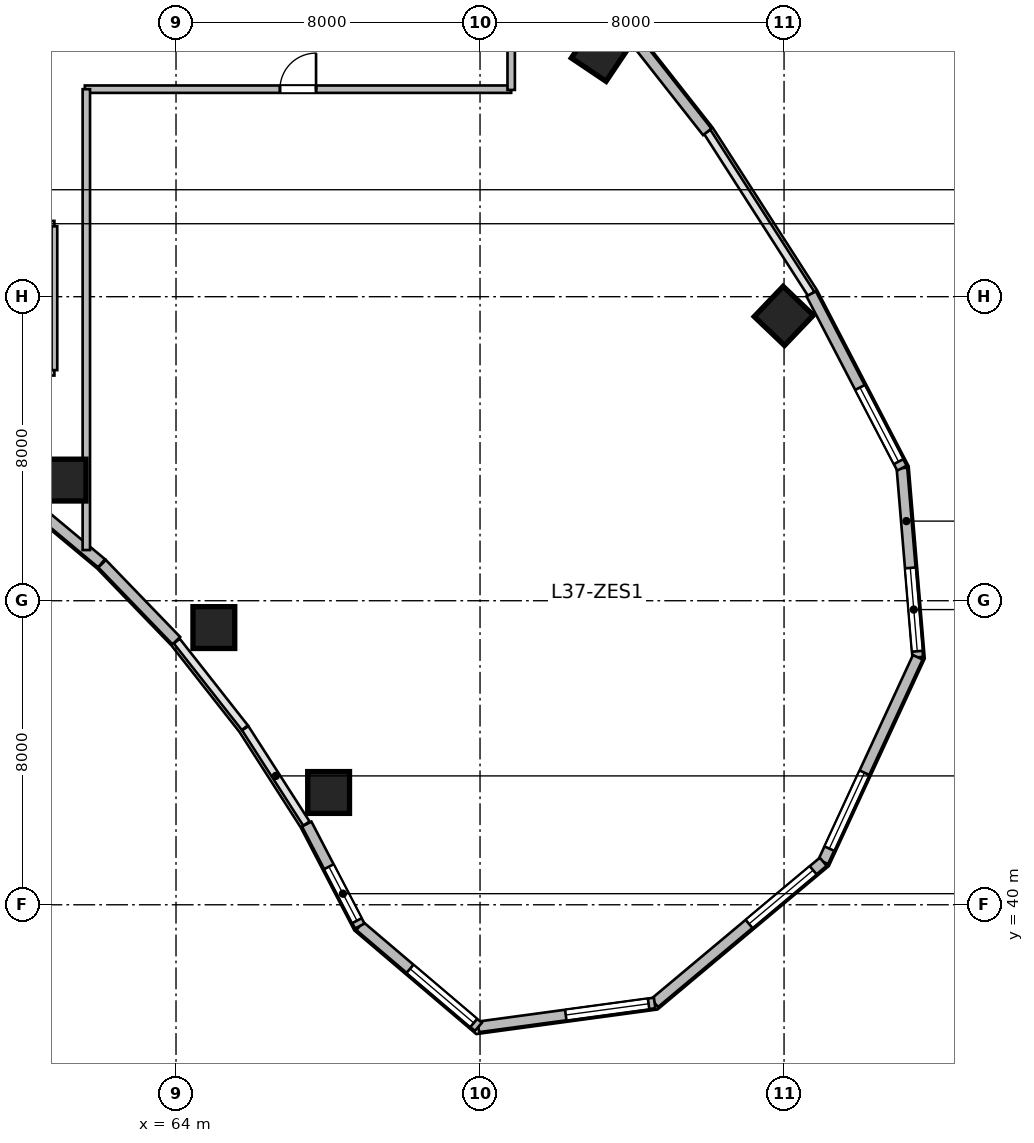
"""IFC4 building model, lengths in metres.
Left out: names, types, materials, properties, quantities, classifications, styles, units other than length and angle.
Written with IfcOpenShell. Run it as: python <this file> out.ifc"""

import sys

from ifc_helpers import new_model, si_unit, direction, frame, frame_2d, origin, origin_2d, place, context, subcontext, project, spatial, rectangle, circle, extrude, source, transform, mapped, element, fill, save


model = new_model("IFC4")
c1 = context("Model", 3, precision=1e-05, world=origin(), true_north=direction((0.0, 1.0)))
c2 = subcontext(c1, "Body", "Model", "MODEL_VIEW")
j1 = project(units=[si_unit("LENGTHUNIT", "METRE"), si_unit("PLANEANGLEUNIT", "RADIAN")], contexts=[c1])
p1 = place(None, origin())
s1 = spatial("IfcSite", under=j1, at=p1, CompositionType="ELEMENT")
p2 = place(p1, origin())
s2 = spatial("IfcBuilding", under=s1, at=p2, CompositionType="ELEMENT")
p3 = place(p2, frame((0.0, 0.0, 154.5)))
s3 = spatial("IfcBuildingStorey", under=s2, at=p3, CompositionType="ELEMENT", Elevation=154.5)
m1 = source(origin(), c2, "Body", "SweptSolid", [
    extrude(circle(Radius=0.55, at=origin_2d()), origin(), (0.0, 0.0, 1.0), 3.9),
])
for number, where, z_axis, x_axis in (
    (1, (61.082, 51.175, 0.0), (0.0, 0.0, 1.0), (0.409, 0.912, 0.0)),
    (2, (64.996, 47.294, 0.0), (0.0, 0.0, 1.0), (0.558, 0.83, 0.0)),
):
    element("IfcColumn", number, at=place(p3, frame(where, z_axis=z_axis, x_axis=x_axis)), inside=s3, PredefinedType="COLUMN", context=c2, shape_type="MappedRepresentation", body=[
        mapped(m1, transform((0.0, 0.0, 0.0), scale=1.0)),
    ])
m2 = source(origin(), c2, "Body", "SweptSolid", [
    extrude(rectangle(XDim=1.1, YDim=1.1, at=origin_2d()), origin(), (0.0, 0.0, 1.0), 3.9),
])
p4 = place(p3, frame((75.167, 62.43, 0.0), z_axis=(0.0, 0.0, 1.0), x_axis=(0.55774510898, 0.830012285095, 0.0)))
e3 = element("IfcColumn", 3, at=p4, inside=s3, PredefinedType="COLUMN", context=c2, shape_type="MappedRepresentation", body=[
    mapped(m2, transform((0.0, 0.0, 0.0), scale=1.0)),
])
p5 = place(p3, frame((68.015, 42.955, 0.0), z_axis=(0.0, 0.0, 1.0), x_axis=(0.690756218984, 0.723087716626, 0.0)))
e4 = element("IfcColumn", 4, at=p5, inside=s3, PredefinedType="COLUMN", context=c2, shape_type="MappedRepresentation", body=[
    mapped(m1, transform((0.0, 0.0, 0.0), scale=1.0)),
])
p6 = place(p3, frame((79.993, 55.494, 0.0), z_axis=(0.0, 0.0, 1.0), x_axis=(0.690756218984, 0.723087716626, 0.0)))
e5 = element("IfcColumn", 5, at=p6, inside=s3, PredefinedType="COLUMN", context=c2, shape_type="MappedRepresentation", body=[
    mapped(m2, transform((0.0, 0.0, 0.0), scale=1.0)),
])
m3 = source(origin(), c2, "Body", "SweptSolid", [
    extrude(rectangle(XDim=4.994, YDim=0.28, at=frame_2d((2.497, 0.0))), origin(), (0.0, 0.0, 1.0), 3.65),
])
p7 = place(p3, frame((83.102, 51.489, 0.0), z_axis=(0.0, 0.0, 1.0), x_axis=(0.083344839916, -0.996520766296, 0.0)))
e6 = element("IfcWall", 6, at=p7, inside=s3, PredefinedType="SOLIDWALL", context=c2, shape_type="MappedRepresentation", body=[
    mapped(m3, transform((0.0, 0.0, 0.0), scale=1.0)),
])
p8 = place(p7, frame((2.635, 0.0, 0.95)))
e7 = element("IfcOpeningElement", 7, at=p8, cuts=e6, PredefinedType="OPENING", context=c2, shape_type="SweptSolid", body=[
    extrude(rectangle(XDim=2.2, YDim=2.1, at=frame_2d((1.1, 1.05))), frame((0.0, 0.15, 0.0), z_axis=(0.0, -1.0, 0.0), x_axis=(1.0, 0.0, 0.0)), (0.0, 0.0, 1.0), 0.3),
])
m4 = source(origin(), c2, "Body", "SweptSolid", [
    extrude(rectangle(XDim=5.927, YDim=0.28, at=frame_2d((2.964, 0.0))), origin(), (0.0, 0.0, 1.0), 3.65),
])
p9 = place(p3, frame((83.519, 46.512, 0.0), z_axis=(0.0, 0.0, 1.0), x_axis=(-0.419656204795, -0.907683132914, 0.0)))
e8 = element("IfcWall", 8, at=p9, inside=s3, PredefinedType="SOLIDWALL", context=c2, shape_type="MappedRepresentation", body=[
    mapped(m4, transform((0.0, 0.0, 0.0), scale=1.0)),
])
p10 = place(p9, frame((3.346, 0.0, 0.95)))
e9 = element("IfcOpeningElement", 9, at=p10, cuts=e8, PredefinedType="OPENING", context=c2, shape_type="SweptSolid", body=[
    extrude(rectangle(XDim=2.2, YDim=2.1, at=frame_2d((1.1, 1.05))), frame((0.0, 0.15, 0.0), z_axis=(0.0, -1.0, 0.0), x_axis=(1.0, 0.0, 0.0)), (0.0, 0.0, 1.0), 0.3),
])
m5 = source(origin(), c2, "Body", "SweptSolid", [
    extrude(rectangle(XDim=5.786, YDim=0.28, at=frame_2d((2.893, 0.0))), origin(), (0.0, 0.0, 1.0), 3.65),
])
p11 = place(p3, frame((81.031, 41.131, 0.0), z_axis=(0.0, 0.0, 1.0), x_axis=(-0.766711306852, -0.641992034176, 0.0)))
e10 = element("IfcWall", 10, at=p11, inside=s3, PredefinedType="SOLIDWALL", context=c2, shape_type="MappedRepresentation", body=[
    mapped(m5, transform((0.0, 0.0, 0.0), scale=1.0)),
])
p12 = place(p11, frame((0.347, 0.0, 0.95)))
e11 = element("IfcOpeningElement", 11, at=p12, cuts=e10, PredefinedType="OPENING", context=c2, shape_type="SweptSolid", body=[
    extrude(rectangle(XDim=2.2, YDim=2.1, at=frame_2d((1.1, 1.05))), frame((0.0, 0.15, 0.0), z_axis=(0.0, -1.0, 0.0), x_axis=(1.0, 0.0, 0.0)), (0.0, 0.0, 1.0), 0.3),
])
m6 = source(origin(), c2, "Body", "SweptSolid", [
    extrude(rectangle(XDim=4.68, YDim=0.28, at=frame_2d((2.34, 0.0))), origin(), (0.0, 0.0, 1.0), 3.65),
])
p13 = place(p3, frame((76.594, 37.417, 0.0), z_axis=(0.0, 0.0, 1.0), x_axis=(-0.990931146435, -0.134370618162, 0.0)))
e12 = element("IfcWall", 12, at=p13, inside=s3, PredefinedType="SOLIDWALL", context=c2, shape_type="MappedRepresentation", body=[
    mapped(m6, transform((0.0, 0.0, 0.0), scale=1.0)),
])
p14 = place(p13, frame((0.16, 0.0, 0.95)))
e13 = element("IfcOpeningElement", 13, at=p14, cuts=e12, PredefinedType="OPENING", context=c2, shape_type="SweptSolid", body=[
    extrude(rectangle(XDim=2.2, YDim=2.1, at=frame_2d((1.1, 1.05))), frame((0.0, 0.15, 0.0), z_axis=(0.0, -1.0, 0.0), x_axis=(1.0, 0.0, 0.0)), (0.0, 0.0, 1.0), 0.3),
])
m7 = source(origin(), c2, "Body", "SweptSolid", [
    extrude(rectangle(XDim=4.096, YDim=0.28, at=frame_2d((2.048, 0.0))), origin(), (0.0, 0.0, 1.0), 3.65),
])
p15 = place(p3, frame((71.957, 36.788, 0.0), z_axis=(0.0, 0.0, 1.0), x_axis=(-0.761926081737, 0.647663991564, 0.0)))
e14 = element("IfcWall", 14, at=p15, inside=s3, PredefinedType="SOLIDWALL", context=c2, shape_type="MappedRepresentation", body=[
    mapped(m7, transform((0.0, 0.0, 0.0), scale=1.0)),
])
p16 = place(p15, frame((0.16, 0.0, 0.95)))
e15 = element("IfcOpeningElement", 15, at=p16, cuts=e14, PredefinedType="OPENING", context=c2, shape_type="SweptSolid", body=[
    extrude(rectangle(XDim=2.2, YDim=2.1, at=frame_2d((1.1, 1.05))), frame((0.0, 0.15, 0.0), z_axis=(0.0, -1.0, 0.0), x_axis=(1.0, 0.0, 0.0)), (0.0, 0.0, 1.0), 0.3),
])
m8 = source(origin(), c2, "Body", "SweptSolid", [
    extrude(rectangle(XDim=3.024, YDim=0.28, at=frame_2d((1.512, 0.0))), origin(), (0.0, 0.0, 1.0), 3.65),
])
p17 = place(p3, frame((68.836, 39.44, 0.0), z_axis=(0.0, 0.0, 1.0), x_axis=(-0.461718746531, 0.887026380161, 0.0)))
e16 = element("IfcWall", 16, at=p17, inside=s3, PredefinedType="SOLIDWALL", context=c2, shape_type="MappedRepresentation", body=[
    mapped(m8, transform((0.0, 0.0, 0.0), scale=1.0)),
])
p18 = place(p17, frame((0.16, 0.0, 0.95)))
e17 = element("IfcOpeningElement", 17, at=p18, cuts=e16, PredefinedType="OPENING", context=c2, shape_type="SweptSolid", body=[
    extrude(rectangle(XDim=1.6, YDim=1.9, at=frame_2d((0.8, 0.95))), frame((0.0, 0.15, 0.0), z_axis=(0.0, -1.0, 0.0), x_axis=(1.0, 0.0, 0.0)), (0.0, 0.0, 1.0), 0.3),
])
m9 = source(origin(), c2, "Body", "SweptSolid", [
    extrude(rectangle(XDim=2.812, YDim=0.28, at=frame_2d((1.406, 0.0))), origin(), (0.0, 0.0, 1.0), 3.65),
])
p19 = place(p3, frame((64.008, 46.95, 0.0), z_axis=(0.0, 0.0, 1.0), x_axis=(-0.694583668785, 0.719411931411, 0.0)))
e18 = element("IfcWall", 18, at=p19, inside=s3, PredefinedType="SOLIDWALL", context=c2, shape_type="MappedRepresentation", body=[
    mapped(m9, transform((0.0, 0.0, 0.0), scale=1.0)),
])
m10 = source(origin(), c2, "Body", "SweptSolid", [
    extrude(rectangle(XDim=2.729, YDim=0.28, at=frame_2d((1.365, 0.0))), origin(), (0.0, 0.0, 1.0), 3.65),
])
p20 = place(p3, frame((62.041, 48.987, 0.0), z_axis=(0.0, 0.0, 1.0), x_axis=(-0.767957284255, 0.640501061326, 0.0)))
e19 = element("IfcWall", 19, at=p20, inside=s3, PredefinedType="SOLIDWALL", context=c2, shape_type="MappedRepresentation", body=[
    mapped(m10, transform((0.0, 0.0, 0.0), scale=1.0)),
])
m11 = source(origin(), c2, "Body", "SweptSolid", [
    extrude(rectangle(XDim=4.922, YDim=0.28, at=frame_2d((2.461, 0.0))), origin(), (0.0, 0.0, 1.0), 3.65),
])
p21 = place(p3, frame((74.936, 64.206, 0.0), z_axis=(0.0, 0.0, 1.0), x_axis=(0.61817639101, -0.786039407153, 0.0)))
e20 = element("IfcWall", 20, at=p21, inside=s3, PredefinedType="SOLIDWALL", context=c2, shape_type="MappedRepresentation", body=[
    mapped(m11, transform((0.0, 0.0, 0.0), scale=1.0)),
])
m12 = source(origin(), c2, "Body", "SweptSolid", [
    extrude(rectangle(XDim=5.171, YDim=0.28, at=frame_2d((2.585, 0.0))), origin(), (0.0, 0.0, 1.0), 3.65),
])
p22 = place(p3, frame((80.715, 56.075, 0.0), z_axis=(0.0, 0.0, 1.0), x_axis=(0.461752581363, -0.887008767491, 0.0)))
e21 = element("IfcWall", 21, at=p22, inside=s3, PredefinedType="SOLIDWALL", context=c2, shape_type="MappedRepresentation", body=[
    mapped(m12, transform((0.0, 0.0, 0.0), scale=1.0)),
])
p23 = place(p22, frame((2.778, 0.0, 0.95)))
e22 = element("IfcOpeningElement", 22, at=p23, cuts=e21, PredefinedType="OPENING", context=c2, shape_type="SweptSolid", body=[
    extrude(rectangle(XDim=2.2, YDim=2.1, at=frame_2d((1.1, 1.05))), frame((0.0, 0.15, 0.0), z_axis=(0.0, -1.0, 0.0), x_axis=(1.0, 0.0, 0.0)), (0.0, 0.0, 1.0), 0.3),
])
m13 = source(origin(), c2, "Body", "SweptSolid", [
    extrude(rectangle(XDim=6.6, YDim=0.15, at=frame_2d((3.3, 0.0))), origin(), (0.0, 0.0, 1.0), 3.095),
])
p24 = place(p3, frame((54.2, 54.0, 0.0), z_axis=(0.0, 0.0, 1.0), x_axis=(1.0, 0.0, 0.0)))
e23 = element("IfcWall", 23, at=p24, inside=s3, PredefinedType="PARTITIONING", context=c2, shape_type="MappedRepresentation", body=[
    mapped(m13, transform((0.0, 0.0, 0.0), scale=1.0)),
])
m14 = source(origin(), c2, "Body", "SweptSolid", [
    extrude(rectangle(XDim=6.6, YDim=0.15, at=frame_2d((3.3, 0.0))), origin(), (0.0, 0.0, 1.0), 3.65),
])
p25 = place(p3, frame((54.2, 57.92, 0.0), z_axis=(0.0, 0.0, 1.0), x_axis=(1.0, 0.0, 0.0)))
e24 = element("IfcWall", 24, at=p25, inside=s3, PredefinedType="PARTITIONING", context=c2, shape_type="MappedRepresentation", body=[
    mapped(m14, transform((0.0, 0.0, 0.0), scale=1.0)),
])
p26 = place(p25, frame((2.825, 0.0, 0.0)))
e25 = element("IfcOpeningElement", 25, at=p26, cuts=e24, PredefinedType="OPENING", context=c2, shape_type="SweptSolid", body=[
    extrude(rectangle(XDim=0.95, YDim=2.1, at=frame_2d((0.475, 1.05))), frame((0.0, 0.085, 0.0), z_axis=(0.0, -1.0, 0.0), x_axis=(1.0, 0.0, 0.0)), (0.0, 0.0, 1.0), 0.17),
])
m15 = source(origin(), c2, "Body", "SweptSolid", [
    extrude(rectangle(XDim=3.785, YDim=0.15, at=frame_2d((1.893, 0.0))), origin(), (0.0, 0.0, 1.0), 3.65),
])
p27 = place(p3, frame((60.8, 54.067, 0.0), z_axis=(0.0, 0.0, 1.0), x_axis=(0.0, 1.0, 0.0)))
e26 = element("IfcWall", 26, at=p27, inside=s3, PredefinedType="PARTITIONING", context=c2, shape_type="MappedRepresentation", body=[
    mapped(m15, transform((0.0, 0.0, 0.0), scale=1.0)),
])
m16 = source(origin(), c2, "Body", "SweptSolid", [
    extrude(rectangle(XDim=11.22, YDim=0.195, at=frame_2d((5.61, 0.0))), origin(), (0.0, 0.0, 1.0), 3.65),
])
p28 = place(p3, frame((61.6, 61.46, 0.0), z_axis=(0.0, 0.0, 1.0), x_axis=(1.0, 0.0, 0.0)))
e27 = element("IfcWall", 27, at=p28, inside=s3, PredefinedType="PARTITIONING", context=c2, shape_type="MappedRepresentation", body=[
    mapped(m16, transform((0.0, 0.0, 0.0), scale=1.0)),
])
p29 = place(p28, frame((5.135, 0.0, 0.0)))
e28 = element("IfcOpeningElement", 28, at=p29, cuts=e27, PredefinedType="OPENING", context=c2, shape_type="SweptSolid", body=[
    extrude(rectangle(XDim=0.95, YDim=2.1, at=frame_2d((0.475, 1.05))), frame((0.0, 0.107, 0.0), z_axis=(0.0, -1.0, 0.0), x_axis=(1.0, 0.0, 0.0)), (0.0, 0.0, 1.0), 0.215),
])
m17 = source(origin(), c2, "Body", "SweptSolid", [
    extrude(rectangle(XDim=12.126, YDim=0.195, at=frame_2d((6.063, 0.0))), origin(), (0.0, 0.0, 1.0), 2.942),
])
p30 = place(p3, frame((61.64, 49.334, 0.0), z_axis=(0.0, 0.0, 1.0), x_axis=(0.0, 1.0, 0.0)))
e29 = element("IfcWall", 29, at=p30, inside=s3, PredefinedType="PARTITIONING", context=c2, shape_type="MappedRepresentation", body=[
    mapped(m17, transform((0.0, 0.0, 0.0), scale=1.0)),
])
m18 = source(origin(), c2, "Body", "SweptSolid", [
    extrude(rectangle(XDim=2.62, YDim=0.195, at=frame_2d((1.31, 0.0))), origin(), (0.0, 0.0, 1.0), 3.022),
])
p31 = place(p3, frame((72.82, 61.44, 0.0), z_axis=(0.0, 0.0, 1.0), x_axis=(0.0, 1.0, 0.0)))
e30 = element("IfcWall", 30, at=p31, inside=s3, PredefinedType="PARTITIONING", context=c2, shape_type="MappedRepresentation", body=[
    mapped(m18, transform((0.0, 0.0, 0.0), scale=1.0)),
])
m19 = source(origin(), c2, "Body", "SweptSolid", [
    extrude(rectangle(XDim=2.2, YDim=2.1, at=frame_2d((1.1, 1.05))), frame((0.0, 0.03, 0.0), z_axis=(0.0, -1.0, 0.0), x_axis=(1.0, 0.0, 0.0)), (0.0, 0.0, 1.0), 0.06),
])
p32 = place(p8, origin())
e31 = element("IfcWindow", 31, at=p32, inside=s3, PartitioningType="TRIPLE_PANEL_VERTICAL", PredefinedType="WINDOW", context=c2, shape_type="MappedRepresentation", body=[
    mapped(m19, transform((0.0, 0.0, 0.0), scale=1.0)),
])
fill(e7, e31)
p33 = place(p10, origin())
e32 = element("IfcWindow", 32, at=p33, inside=s3, PartitioningType="TRIPLE_PANEL_VERTICAL", PredefinedType="WINDOW", context=c2, shape_type="MappedRepresentation", body=[
    mapped(m19, transform((0.0, 0.0, 0.0), scale=1.0)),
])
fill(e9, e32)
p34 = place(p12, origin())
e33 = element("IfcWindow", 33, at=p34, inside=s3, PartitioningType="TRIPLE_PANEL_VERTICAL", PredefinedType="WINDOW", context=c2, shape_type="MappedRepresentation", body=[
    mapped(m19, transform((0.0, 0.0, 0.0), scale=1.0)),
])
fill(e11, e33)
p35 = place(p14, origin())
e34 = element("IfcWindow", 34, at=p35, inside=s3, PartitioningType="TRIPLE_PANEL_VERTICAL", PredefinedType="WINDOW", context=c2, shape_type="MappedRepresentation", body=[
    mapped(m19, transform((0.0, 0.0, 0.0), scale=1.0)),
])
fill(e13, e34)
p36 = place(p16, origin())
e35 = element("IfcWindow", 35, at=p36, inside=s3, PartitioningType="TRIPLE_PANEL_VERTICAL", PredefinedType="WINDOW", context=c2, shape_type="MappedRepresentation", body=[
    mapped(m19, transform((0.0, 0.0, 0.0), scale=1.0)),
])
fill(e15, e35)
m20 = source(origin(), c2, "Body", "SweptSolid", [
    extrude(rectangle(XDim=1.6, YDim=1.9, at=frame_2d((0.8, 0.95))), frame((0.0, 0.03, 0.0), z_axis=(0.0, -1.0, 0.0), x_axis=(1.0, 0.0, 0.0)), (0.0, 0.0, 1.0), 0.06),
])
p37 = place(p18, origin())
e36 = element("IfcWindow", 36, at=p37, inside=s3, PartitioningType="SINGLE_PANEL", PredefinedType="WINDOW", context=c2, shape_type="MappedRepresentation", body=[
    mapped(m20, transform((0.0, 0.0, 0.0), scale=1.0)),
])
fill(e17, e36)
p38 = place(p23, origin())
e37 = element("IfcWindow", 37, at=p38, inside=s3, PartitioningType="TRIPLE_PANEL_VERTICAL", PredefinedType="WINDOW", context=c2, shape_type="MappedRepresentation", body=[
    mapped(m19, transform((0.0, 0.0, 0.0), scale=1.0)),
])
fill(e22, e37)
m21 = source(origin(), c2, "Body", "SweptSolid", [
    extrude(rectangle(XDim=0.95, YDim=2.1, at=frame_2d((0.475, 1.05))), frame((0.0, 0.025, 0.0), z_axis=(0.0, -1.0, 0.0), x_axis=(1.0, 0.0, 0.0)), (0.0, 0.0, 1.0), 0.05),
])
p39 = place(p29, origin())
e38 = element("IfcDoor", 38, at=p39, inside=s3, OperationType="SINGLE_SWING_RIGHT", PredefinedType="DOOR", context=c2, shape_type="MappedRepresentation", body=[
    mapped(m21, transform((0.0, 0.0, 0.0), scale=1.0)),
])
fill(e28, e38)
save(model, sys.argv[1])
